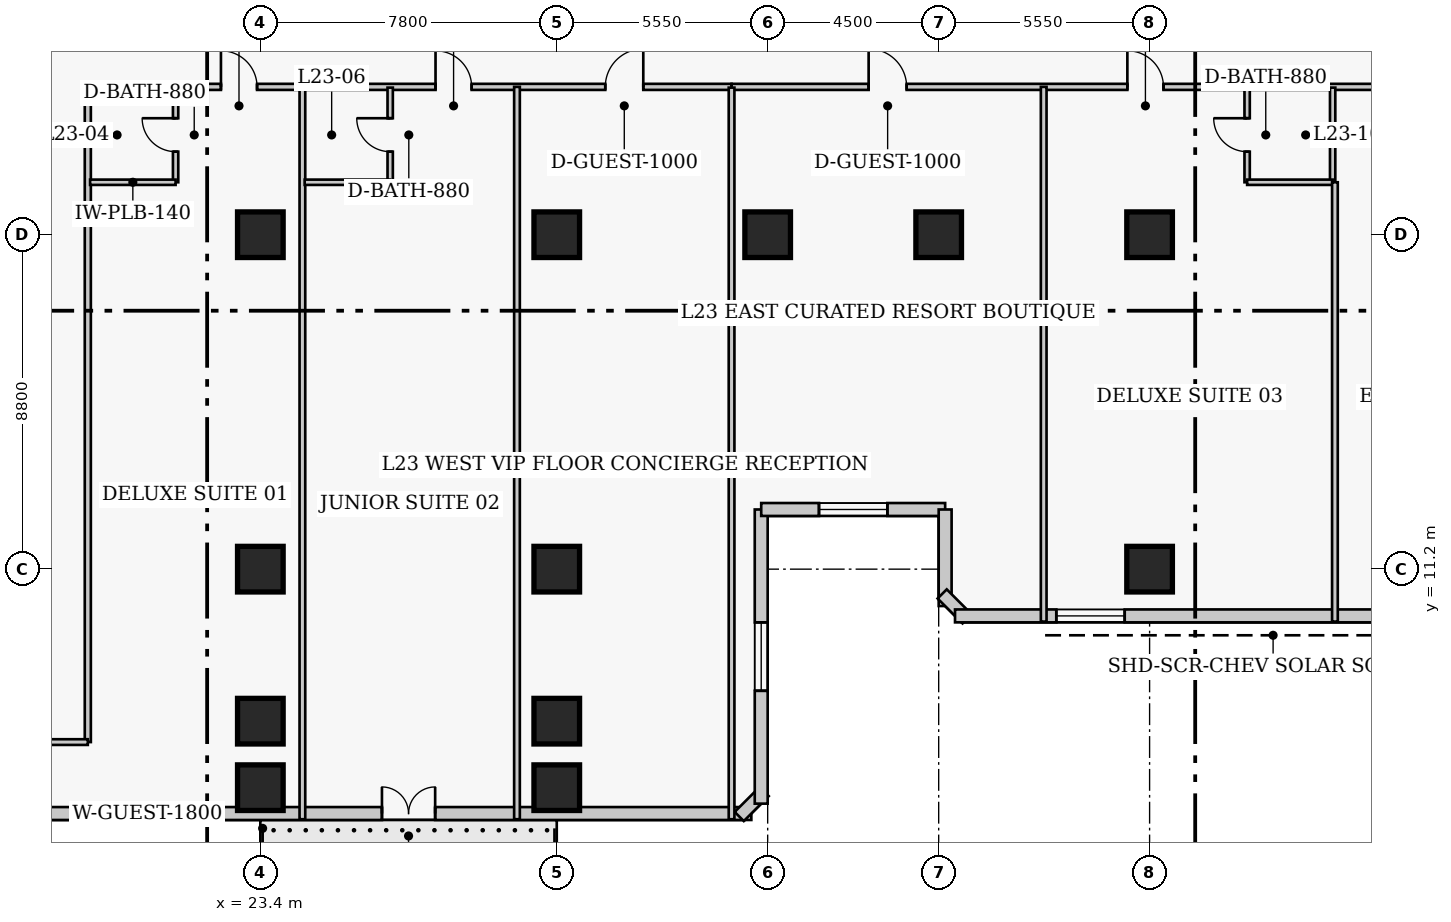
"""IFC4 building model, lengths in metres.
Left out: names, types, materials, properties, quantities, classifications, styles, units other than length and angle.
Written with IfcOpenShell. Run it as: python <this file> out.ifc"""

import sys

from ifc_helpers import new_model, si_unit, direction, frame, frame_2d, origin, origin_2d, place, context, subcontext, project, spatial, rectangle, extrude, element, fill, save


model = new_model("IFC4")
c1 = context("Model", 3, precision=1e-05, world=origin(), true_north=direction((0.0, 1.0)))
c2 = subcontext(c1, "Body", "Model", "MODEL_VIEW")
j1 = project(units=[si_unit("LENGTHUNIT", "METRE"), si_unit("PLANEANGLEUNIT", "RADIAN")], contexts=[c1])
p1 = place(None, origin())
s1 = spatial("IfcSite", under=j1, at=p1, CompositionType="ELEMENT")
p2 = place(p1, origin())
s2 = spatial("IfcBuilding", under=s1, at=p2, CompositionType="ELEMENT")
p3 = place(p2, frame((0.0, 0.0, 95.6)))
s3 = spatial("IfcBuildingStorey", under=s2, at=p3, CompositionType="ELEMENT", Elevation=95.6)
for number, where, z_axis, x_axis in (
    (1, (23.4, 11.2, 0.0), (0.0, 0.0, 1.0), (1.0, 0.0, 0.0)),
    (2, (23.4, 20.0, 0.0), (0.0, 0.0, 1.0), (1.0, 0.0, 0.0)),
    (3, (31.2, 11.2, 0.0), (0.0, 0.0, 1.0), (1.0, 0.0, 0.0)),
    (4, (31.2, 20.0, 0.0), (0.0, 0.0, 1.0), (1.0, 0.0, 0.0)),
    (5, (36.75, 20.0, 0.0), (0.0, 0.0, 1.0), (1.0, 0.0, 0.0)),
    (6, (41.25, 20.0, 0.0), (0.0, 0.0, 1.0), (1.0, 0.0, 0.0)),
    (7, (46.8, 11.2, 0.0), (0.0, 0.0, 1.0), (1.0, 0.0, 0.0)),
    (8, (46.8, 20.0, 0.0), (0.0, 0.0, 1.0), (1.0, 0.0, 0.0)),
    (9, (23.4, 7.2, 0.0), (0.0, 0.0, 1.0), (1.0, 0.0, 0.0)),
    (10, (31.2, 7.2, 0.0), (0.0, 0.0, 1.0), (1.0, 0.0, 0.0)),
    (11, (23.4, 5.45, 0.0), (0.0, 0.0, 1.0), (1.0, 0.0, 0.0)),
    (12, (31.2, 5.45, 0.0), (0.0, 0.0, 1.0), (1.0, 0.0, 0.0)),
):
    element("IfcColumn", number, at=place(p3, frame(where, z_axis=z_axis, x_axis=x_axis)), inside=s3, PredefinedType="COLUMN", context=c2, shape_type="SweptSolid", body=[
        extrude(rectangle(XDim=1.2, YDim=1.2, at=origin_2d()), origin(), (0.0, 0.0, 1.0), 3.8),
    ])
p4 = place(p3, frame((8.03, 4.77, 0.0), z_axis=(0.0, 0.0, 1.0), x_axis=(1.0, 0.0, 0.0)))
e13 = element("IfcWall", 13, at=p4, inside=s3, PredefinedType="SOLIDWALL", context=c2, shape_type="SweptSolid", body=[
    extrude(rectangle(XDim=28.29, YDim=0.34, at=frame_2d((14.145, 0.0))), origin(), (0.0, 0.0, 1.0), 3.54),
])
p5 = place(p4, frame((18.57, 0.0, 0.0)))
e14 = element("IfcOpeningElement", 14, at=p5, cuts=e13, PredefinedType="OPENING", context=c2, shape_type="SweptSolid", body=[
    extrude(rectangle(XDim=1.4, YDim=2.15, at=frame_2d((0.7, 1.075))), frame((0.0, 0.18, 0.0), z_axis=(0.0, -1.0, 0.0), x_axis=(1.0, 0.0, 0.0)), (0.0, 0.0, 1.0), 0.36),
])
p6 = place(p4, frame((12.595, 0.0, 0.85)))
e15 = element("IfcOpeningElement", 15, at=p6, cuts=e13, PredefinedType="OPENING", context=c2, shape_type="SweptSolid", body=[
    extrude(rectangle(XDim=1.8, YDim=1.8, at=frame_2d((0.9, 0.9))), frame((0.0, 0.18, 0.0), z_axis=(0.0, -1.0, 0.0), x_axis=(1.0, 0.0, 0.0)), (0.0, 0.0, 1.0), 0.36),
])
p7 = place(p3, frame((36.001, 4.692, 0.0), z_axis=(0.0, 0.0, 1.0), x_axis=(0.707238225886, 0.706975312048, 0.0)))
e16 = element("IfcWall", 16, at=p7, inside=s3, PredefinedType="SOLIDWALL", context=c2, shape_type="SweptSolid", body=[
    extrude(rectangle(XDim=0.929, YDim=0.34, at=frame_2d((0.464, 0.0))), origin(), (0.0, 0.0, 1.0), 3.54),
])
p8 = place(p3, frame((36.58, 5.03, 0.0), z_axis=(0.0, 0.0, 1.0), x_axis=(0.0, 1.0, 0.0)))
e17 = element("IfcWall", 17, at=p8, inside=s3, PredefinedType="SOLIDWALL", context=c2, shape_type="SweptSolid", body=[
    extrude(rectangle(XDim=7.74, YDim=0.34, at=frame_2d((3.87, 0.0))), origin(), (0.0, 0.0, 1.0), 3.54),
])
p9 = place(p8, frame((2.97, 0.0, 0.85)))
e18 = element("IfcOpeningElement", 18, at=p9, cuts=e17, PredefinedType="OPENING", context=c2, shape_type="SweptSolid", body=[
    extrude(rectangle(XDim=1.8, YDim=1.8, at=frame_2d((0.9, 0.9))), frame((0.0, 0.18, 0.0), z_axis=(0.0, -1.0, 0.0), x_axis=(1.0, 0.0, 0.0)), (0.0, 0.0, 1.0), 0.36),
])
p10 = place(p3, frame((36.58, 12.77, 0.0), z_axis=(0.0, 0.0, 1.0), x_axis=(1.0, 0.0, 0.0)))
e19 = element("IfcWall", 19, at=p10, inside=s3, PredefinedType="SOLIDWALL", context=c2, shape_type="SweptSolid", body=[
    extrude(rectangle(XDim=4.84, YDim=0.34, at=frame_2d((2.42, 0.0))), origin(), (0.0, 0.0, 1.0), 3.54),
])
p11 = place(p10, frame((1.52, 0.0, 0.85)))
e20 = element("IfcOpeningElement", 20, at=p11, cuts=e19, PredefinedType="OPENING", context=c2, shape_type="SweptSolid", body=[
    extrude(rectangle(XDim=1.8, YDim=1.8, at=frame_2d((0.9, 0.9))), frame((0.0, 0.18, 0.0), z_axis=(0.0, -1.0, 0.0), x_axis=(1.0, 0.0, 0.0)), (0.0, 0.0, 1.0), 0.36),
])
p12 = place(p3, frame((41.42, 12.77, 0.0), z_axis=(0.0, 0.0, 1.0), x_axis=(0.0, -1.0, 0.0)))
e21 = element("IfcWall", 21, at=p12, inside=s3, PredefinedType="SOLIDWALL", context=c2, shape_type="SweptSolid", body=[
    extrude(rectangle(XDim=2.54, YDim=0.34, at=frame_2d((1.27, 0.0))), origin(), (0.0, 0.0, 1.0), 3.54),
])
p13 = place(p3, frame((41.342, 10.549, 0.0), z_axis=(0.0, 0.0, 1.0), x_axis=(0.707106781187, -0.707106781187, 0.0)))
e22 = element("IfcWall", 22, at=p13, inside=s3, PredefinedType="SOLIDWALL", context=c2, shape_type="SweptSolid", body=[
    extrude(rectangle(XDim=0.929, YDim=0.34, at=frame_2d((0.464, 0.0))), origin(), (0.0, 0.0, 1.0), 3.54),
])
p14 = place(p3, frame((41.68, 9.97, 0.0), z_axis=(0.0, 0.0, 1.0), x_axis=(1.0, 0.0, 0.0)))
e23 = element("IfcWall", 23, at=p14, inside=s3, PredefinedType="SOLIDWALL", context=c2, shape_type="SweptSolid", body=[
    extrude(rectangle(XDim=28.29, YDim=0.34, at=frame_2d((14.145, 0.0))), origin(), (0.0, 0.0, 1.0), 3.54),
])
p15 = place(p14, frame((2.665, 0.0, 0.85)))
e24 = element("IfcOpeningElement", 24, at=p15, cuts=e23, PredefinedType="OPENING", context=c2, shape_type="SweptSolid", body=[
    extrude(rectangle(XDim=1.8, YDim=1.8, at=frame_2d((0.9, 0.9))), frame((0.0, 0.18, 0.0), z_axis=(0.0, -1.0, 0.0), x_axis=(1.0, 0.0, 0.0)), (0.0, 0.0, 1.0), 0.36),
])
p16 = place(p14, frame((13.895, 0.0, 0.85)))
e25 = element("IfcOpeningElement", 25, at=p16, cuts=e23, PredefinedType="OPENING", context=c2, shape_type="SweptSolid", body=[
    extrude(rectangle(XDim=1.8, YDim=1.8, at=frame_2d((0.9, 0.9))), frame((0.0, 0.18, 0.0), z_axis=(0.0, -1.0, 0.0), x_axis=(1.0, 0.0, 0.0)), (0.0, 0.0, 1.0), 0.36),
])
p17 = place(p3, frame((18.8, 23.89, 0.0), z_axis=(0.0, 0.0, 1.0), x_axis=(1.0, 0.0, 0.0)))
e26 = element("IfcWall", 26, at=p17, inside=s3, PredefinedType="PARTITIONING", context=c2, shape_type="SweptSolid", body=[
    extrude(rectangle(XDim=17.0, YDim=0.16, at=frame_2d((8.5, 0.0))), origin(), (0.0, 0.0, 1.0), 3.54),
])
p18 = place(p17, frame((3.563, 0.0, 0.0)))
e27 = element("IfcOpeningElement", 27, at=p18, cuts=e26, PredefinedType="OPENING", context=c2, shape_type="SweptSolid", body=[
    extrude(rectangle(XDim=0.95, YDim=2.1, at=frame_2d((0.475, 1.05))), frame((0.0, 0.09, 0.0), z_axis=(0.0, -1.0, 0.0), x_axis=(1.0, 0.0, 0.0)), (0.0, 0.0, 1.0), 0.18),
])
p19 = place(p17, frame((9.21, 0.0, 0.0)))
e28 = element("IfcOpeningElement", 28, at=p19, cuts=e26, PredefinedType="OPENING", context=c2, shape_type="SweptSolid", body=[
    extrude(rectangle(XDim=0.95, YDim=2.1, at=frame_2d((0.475, 1.05))), frame((0.0, 0.09, 0.0), z_axis=(0.0, -1.0, 0.0), x_axis=(1.0, 0.0, 0.0)), (0.0, 0.0, 1.0), 0.18),
])
p20 = place(p17, frame((13.677, 0.0, 0.0)))
e29 = element("IfcOpeningElement", 29, at=p20, cuts=e26, PredefinedType="OPENING", context=c2, shape_type="SweptSolid", body=[
    extrude(rectangle(XDim=1.0, YDim=2.15, at=frame_2d((0.5, 1.075))), frame((0.0, 0.09, 0.0), z_axis=(0.0, -1.0, 0.0), x_axis=(1.0, 0.0, 0.0)), (0.0, 0.0, 1.0), 0.18),
])
p21 = place(p3, frame((35.8, 23.89, 0.0), z_axis=(0.0, 0.0, 1.0), x_axis=(1.0, 0.0, 0.0)))
e30 = element("IfcWall", 30, at=p21, inside=s3, PredefinedType="PARTITIONING", context=c2, shape_type="SweptSolid", body=[
    extrude(rectangle(XDim=23.05, YDim=0.16, at=frame_2d((11.525, 0.0))), origin(), (0.0, 0.0, 1.0), 3.54),
])
p22 = place(p21, frame((3.607, 0.0, 0.0)))
e31 = element("IfcOpeningElement", 31, at=p22, cuts=e30, PredefinedType="OPENING", context=c2, shape_type="SweptSolid", body=[
    extrude(rectangle(XDim=1.0, YDim=2.15, at=frame_2d((0.5, 1.075))), frame((0.0, 0.09, 0.0), z_axis=(0.0, -1.0, 0.0), x_axis=(1.0, 0.0, 0.0)), (0.0, 0.0, 1.0), 0.18),
])
p23 = place(p21, frame((10.415, 0.0, 0.0)))
e32 = element("IfcOpeningElement", 32, at=p23, cuts=e30, PredefinedType="OPENING", context=c2, shape_type="SweptSolid", body=[
    extrude(rectangle(XDim=0.95, YDim=2.1, at=frame_2d((0.475, 1.05))), frame((0.0, 0.09, 0.0), z_axis=(0.0, -1.0, 0.0), x_axis=(1.0, 0.0, 0.0)), (0.0, 0.0, 1.0), 0.18),
])
p24 = place(p21, frame((17.803, 0.0, 0.0)))
e33 = element("IfcOpeningElement", 33, at=p24, cuts=e30, PredefinedType="OPENING", context=c2, shape_type="SweptSolid", body=[
    extrude(rectangle(XDim=0.95, YDim=2.1, at=frame_2d((0.475, 1.05))), frame((0.0, 0.09, 0.0), z_axis=(0.0, -1.0, 0.0), x_axis=(1.0, 0.0, 0.0)), (0.0, 0.0, 1.0), 0.18),
])
p25 = place(p3, frame((18.86, 6.65, 0.0), z_axis=(0.0, 0.0, 1.0), x_axis=(0.0, 1.0, 0.0)))
e34 = element("IfcWall", 34, at=p25, inside=s3, PredefinedType="PARTITIONING", context=c2, shape_type="SweptSolid", body=[
    extrude(rectangle(XDim=17.24, YDim=0.16, at=frame_2d((8.62, 0.0))), origin(), (0.0, 0.0, 1.0), 3.54),
])
p26 = place(p3, frame((16.64, 6.65, 0.0), z_axis=(0.0, 0.0, 1.0), x_axis=(1.0, 0.0, 0.0)))
e35 = element("IfcWall", 35, at=p26, inside=s3, PredefinedType="PARTITIONING", context=c2, shape_type="SweptSolid", body=[
    extrude(rectangle(XDim=2.22, YDim=0.15, at=frame_2d((1.11, 0.0))), origin(), (0.0, 0.0, 1.0), 3.54),
])
p27 = place(p3, frame((21.17, 21.38, 0.0), z_axis=(0.0, 0.0, 1.0), x_axis=(0.0, 1.0, 0.0)))
e36 = element("IfcWall", 36, at=p27, inside=s3, PredefinedType="PLUMBINGWALL", context=c2, shape_type="SweptSolid", body=[
    extrude(rectangle(XDim=2.49, YDim=0.14, at=frame_2d((1.245, 0.0))), origin(), (0.0, 0.0, 1.0), 3.54),
])
p28 = place(p27, frame((0.805, 0.0, 0.0)))
e37 = element("IfcOpeningElement", 37, at=p28, cuts=e36, PredefinedType="OPENING", context=c2, shape_type="SweptSolid", body=[
    extrude(rectangle(XDim=0.88, YDim=2.05, at=frame_2d((0.44, 1.025))), frame((0.0, 0.08, 0.0), z_axis=(0.0, -1.0, 0.0), x_axis=(1.0, 0.0, 0.0)), (0.0, 0.0, 1.0), 0.16),
])
p29 = place(p3, frame((18.92, 21.38, 0.0), z_axis=(0.0, 0.0, 1.0), x_axis=(1.0, 0.0, 0.0)))
e38 = element("IfcWall", 38, at=p29, inside=s3, PredefinedType="PLUMBINGWALL", context=c2, shape_type="SweptSolid", body=[
    extrude(rectangle(XDim=2.25, YDim=0.14, at=frame_2d((1.125, 0.0))), origin(), (0.0, 0.0, 1.0), 3.54),
])
p30 = place(p3, frame((24.507, 4.62, 0.0), z_axis=(0.0, 0.0, 1.0), x_axis=(0.0, 1.0, 0.0)))
e39 = element("IfcWall", 39, at=p30, inside=s3, PredefinedType="PARTITIONING", context=c2, shape_type="SweptSolid", body=[
    extrude(rectangle(XDim=19.27, YDim=0.15, at=frame_2d((9.635, 0.0))), origin(), (0.0, 0.0, 1.0), 3.54),
])
p31 = place(p3, frame((26.817, 21.38, 0.0), z_axis=(0.0, 0.0, 1.0), x_axis=(0.0, 1.0, 0.0)))
e40 = element("IfcWall", 40, at=p31, inside=s3, PredefinedType="PLUMBINGWALL", context=c2, shape_type="SweptSolid", body=[
    extrude(rectangle(XDim=2.49, YDim=0.14, at=frame_2d((1.245, 0.0))), origin(), (0.0, 0.0, 1.0), 3.54),
])
p32 = place(p31, frame((0.805, 0.0, 0.0)))
e41 = element("IfcOpeningElement", 41, at=p32, cuts=e40, PredefinedType="OPENING", context=c2, shape_type="SweptSolid", body=[
    extrude(rectangle(XDim=0.88, YDim=2.05, at=frame_2d((0.44, 1.025))), frame((0.0, 0.08, 0.0), z_axis=(0.0, -1.0, 0.0), x_axis=(1.0, 0.0, 0.0)), (0.0, 0.0, 1.0), 0.16),
])
p33 = place(p3, frame((24.567, 21.38, 0.0), z_axis=(0.0, 0.0, 1.0), x_axis=(1.0, 0.0, 0.0)))
e42 = element("IfcWall", 42, at=p33, inside=s3, PredefinedType="PLUMBINGWALL", context=c2, shape_type="SweptSolid", body=[
    extrude(rectangle(XDim=2.25, YDim=0.14, at=frame_2d((1.125, 0.0))), origin(), (0.0, 0.0, 1.0), 3.54),
])
p34 = place(p3, frame((30.153, 4.62, 0.0), z_axis=(0.0, 0.0, 1.0), x_axis=(0.0, 1.0, 0.0)))
e43 = element("IfcWall", 43, at=p34, inside=s3, PredefinedType="PARTITIONING", context=c2, shape_type="SweptSolid", body=[
    extrude(rectangle(XDim=19.27, YDim=0.15, at=frame_2d((9.635, 0.0))), origin(), (0.0, 0.0, 1.0), 3.54),
])
p35 = place(p3, frame((35.8, 4.62, 0.0), z_axis=(0.0, 0.0, 1.0), x_axis=(0.0, 1.0, 0.0)))
e44 = element("IfcWall", 44, at=p35, inside=s3, PredefinedType="PARTITIONING", context=c2, shape_type="SweptSolid", body=[
    extrude(rectangle(XDim=19.25, YDim=0.15, at=frame_2d((9.625, 0.0))), origin(), (0.0, 0.0, 1.0), 3.54),
])
p36 = place(p3, frame((44.013, 9.82, 0.0), z_axis=(0.0, 0.0, 1.0), x_axis=(0.0, 1.0, 0.0)))
e45 = element("IfcWall", 45, at=p36, inside=s3, PredefinedType="PARTITIONING", context=c2, shape_type="SweptSolid", body=[
    extrude(rectangle(XDim=14.07, YDim=0.15, at=frame_2d((7.035, 0.0))), origin(), (0.0, 0.0, 1.0), 3.54),
])
p37 = place(p3, frame((49.367, 21.38, 0.0), z_axis=(0.0, 0.0, 1.0), x_axis=(0.0, 1.0, 0.0)))
e46 = element("IfcWall", 46, at=p37, inside=s3, PredefinedType="PLUMBINGWALL", context=c2, shape_type="SweptSolid", body=[
    extrude(rectangle(XDim=2.49, YDim=0.14, at=frame_2d((1.245, 0.0))), origin(), (0.0, 0.0, 1.0), 3.54),
])
p38 = place(p37, frame((0.805, 0.0, 0.0)))
e47 = element("IfcOpeningElement", 47, at=p38, cuts=e46, PredefinedType="OPENING", context=c2, shape_type="SweptSolid", body=[
    extrude(rectangle(XDim=0.88, YDim=2.05, at=frame_2d((0.44, 1.025))), frame((0.0, 0.08, 0.0), z_axis=(0.0, -1.0, 0.0), x_axis=(1.0, 0.0, 0.0)), (0.0, 0.0, 1.0), 0.16),
])
p39 = place(p3, frame((51.617, 21.38, 0.0), z_axis=(0.0, 0.0, 1.0), x_axis=(0.0, 1.0, 0.0)))
e48 = element("IfcWall", 48, at=p39, inside=s3, PredefinedType="PLUMBINGWALL", context=c2, shape_type="SweptSolid", body=[
    extrude(rectangle(XDim=2.49, YDim=0.14, at=frame_2d((1.245, 0.0))), origin(), (0.0, 0.0, 1.0), 3.54),
])
p40 = place(p3, frame((49.367, 21.38, 0.0), z_axis=(0.0, 0.0, 1.0), x_axis=(1.0, 0.0, 0.0)))
e49 = element("IfcWall", 49, at=p40, inside=s3, PredefinedType="PLUMBINGWALL", context=c2, shape_type="SweptSolid", body=[
    extrude(rectangle(XDim=2.25, YDim=0.14, at=frame_2d((1.125, 0.0))), origin(), (0.0, 0.0, 1.0), 3.54),
])
p41 = place(p3, frame((51.677, 9.82, 0.0), z_axis=(0.0, 0.0, 1.0), x_axis=(0.0, 1.0, 0.0)))
e50 = element("IfcWall", 50, at=p41, inside=s3, PredefinedType="PARTITIONING", context=c2, shape_type="SweptSolid", body=[
    extrude(rectangle(XDim=11.56, YDim=0.15, at=frame_2d((5.78, 0.0))), origin(), (0.0, 0.0, 1.0), 3.54),
])
p42 = place(p5, origin())
e51 = element("IfcDoor", 51, at=p42, inside=s3, OperationType="DOUBLE_DOOR_SINGLE_SWING", PredefinedType="DOOR", context=c2, shape_type="SweptSolid", body=[
    extrude(rectangle(XDim=1.4, YDim=2.15, at=frame_2d((0.7, 1.075))), frame((0.0, 0.025, 0.0), z_axis=(0.0, -1.0, 0.0), x_axis=(1.0, 0.0, 0.0)), (0.0, 0.0, 1.0), 0.05),
])
fill(e14, e51)
p43 = place(p6, origin())
e52 = element("IfcWindow", 52, at=p43, inside=s3, PartitioningType="SINGLE_PANEL", PredefinedType="WINDOW", context=c2, shape_type="SweptSolid", body=[
    extrude(rectangle(XDim=1.8, YDim=1.8, at=frame_2d((0.9, 0.9))), frame((0.0, 0.03, 0.0), z_axis=(0.0, -1.0, 0.0), x_axis=(1.0, 0.0, 0.0)), (0.0, 0.0, 1.0), 0.06),
])
fill(e15, e52)
p44 = place(p9, origin())
e53 = element("IfcWindow", 53, at=p44, inside=s3, PartitioningType="SINGLE_PANEL", PredefinedType="WINDOW", context=c2, shape_type="SweptSolid", body=[
    extrude(rectangle(XDim=1.8, YDim=1.8, at=frame_2d((0.9, 0.9))), frame((0.0, 0.03, 0.0), z_axis=(0.0, -1.0, 0.0), x_axis=(1.0, 0.0, 0.0)), (0.0, 0.0, 1.0), 0.06),
])
fill(e18, e53)
p45 = place(p11, origin())
e54 = element("IfcWindow", 54, at=p45, inside=s3, PartitioningType="SINGLE_PANEL", PredefinedType="WINDOW", context=c2, shape_type="SweptSolid", body=[
    extrude(rectangle(XDim=1.8, YDim=1.8, at=frame_2d((0.9, 0.9))), frame((0.0, 0.03, 0.0), z_axis=(0.0, -1.0, 0.0), x_axis=(1.0, 0.0, 0.0)), (0.0, 0.0, 1.0), 0.06),
])
fill(e20, e54)
p46 = place(p15, origin())
e55 = element("IfcWindow", 55, at=p46, inside=s3, PartitioningType="SINGLE_PANEL", PredefinedType="WINDOW", context=c2, shape_type="SweptSolid", body=[
    extrude(rectangle(XDim=1.8, YDim=1.8, at=frame_2d((0.9, 0.9))), frame((0.0, 0.03, 0.0), z_axis=(0.0, -1.0, 0.0), x_axis=(1.0, 0.0, 0.0)), (0.0, 0.0, 1.0), 0.06),
])
fill(e24, e55)
p47 = place(p28, origin())
e56 = element("IfcDoor", 56, at=p47, inside=s3, OperationType="SINGLE_SWING_RIGHT", PredefinedType="DOOR", context=c2, shape_type="SweptSolid", body=[
    extrude(rectangle(XDim=0.88, YDim=2.05, at=frame_2d((0.44, 1.025))), frame((0.0, 0.025, 0.0), z_axis=(0.0, -1.0, 0.0), x_axis=(1.0, 0.0, 0.0)), (0.0, 0.0, 1.0), 0.05),
])
fill(e37, e56)
p48 = place(p18, origin())
e57 = element("IfcDoor", 57, at=p48, inside=s3, OperationType="SINGLE_SWING_LEFT", PredefinedType="DOOR", context=c2, shape_type="SweptSolid", body=[
    extrude(rectangle(XDim=0.95, YDim=2.1, at=frame_2d((0.475, 1.05))), frame((0.0, 0.025, 0.0), z_axis=(0.0, -1.0, 0.0), x_axis=(1.0, 0.0, 0.0)), (0.0, 0.0, 1.0), 0.05),
])
fill(e27, e57)
p49 = place(p32, origin())
e58 = element("IfcDoor", 58, at=p49, inside=s3, OperationType="SINGLE_SWING_RIGHT", PredefinedType="DOOR", context=c2, shape_type="SweptSolid", body=[
    extrude(rectangle(XDim=0.88, YDim=2.05, at=frame_2d((0.44, 1.025))), frame((0.0, 0.025, 0.0), z_axis=(0.0, -1.0, 0.0), x_axis=(1.0, 0.0, 0.0)), (0.0, 0.0, 1.0), 0.05),
])
fill(e41, e58)
p50 = place(p19, origin())
e59 = element("IfcDoor", 59, at=p50, inside=s3, OperationType="SINGLE_SWING_LEFT", PredefinedType="DOOR", context=c2, shape_type="SweptSolid", body=[
    extrude(rectangle(XDim=0.95, YDim=2.1, at=frame_2d((0.475, 1.05))), frame((0.0, 0.025, 0.0), z_axis=(0.0, -1.0, 0.0), x_axis=(1.0, 0.0, 0.0)), (0.0, 0.0, 1.0), 0.05),
])
fill(e28, e59)
p51 = place(p20, origin())
e60 = element("IfcDoor", 60, at=p51, inside=s3, OperationType="SINGLE_SWING_RIGHT", PredefinedType="DOOR", context=c2, shape_type="SweptSolid", body=[
    extrude(rectangle(XDim=1.0, YDim=2.15, at=frame_2d((0.5, 1.075))), frame((0.0, 0.025, 0.0), z_axis=(0.0, -1.0, 0.0), x_axis=(1.0, 0.0, 0.0)), (0.0, 0.0, 1.0), 0.05),
])
fill(e29, e60)
p52 = place(p22, origin())
e61 = element("IfcDoor", 61, at=p52, inside=s3, OperationType="SINGLE_SWING_LEFT", PredefinedType="DOOR", context=c2, shape_type="SweptSolid", body=[
    extrude(rectangle(XDim=1.0, YDim=2.15, at=frame_2d((0.5, 1.075))), frame((0.0, 0.025, 0.0), z_axis=(0.0, -1.0, 0.0), x_axis=(1.0, 0.0, 0.0)), (0.0, 0.0, 1.0), 0.05),
])
fill(e31, e61)
p53 = place(p38, origin())
e62 = element("IfcDoor", 62, at=p53, inside=s3, OperationType="SINGLE_SWING_RIGHT", PredefinedType="DOOR", context=c2, shape_type="SweptSolid", body=[
    extrude(rectangle(XDim=0.88, YDim=2.05, at=frame_2d((0.44, 1.025))), frame((0.0, 0.025, 0.0), z_axis=(0.0, -1.0, 0.0), x_axis=(1.0, 0.0, 0.0)), (0.0, 0.0, 1.0), 0.05),
])
fill(e47, e62)
p54 = place(p23, origin())
e63 = element("IfcDoor", 63, at=p54, inside=s3, OperationType="SINGLE_SWING_LEFT", PredefinedType="DOOR", context=c2, shape_type="SweptSolid", body=[
    extrude(rectangle(XDim=0.95, YDim=2.1, at=frame_2d((0.475, 1.05))), frame((0.0, 0.025, 0.0), z_axis=(0.0, -1.0, 0.0), x_axis=(1.0, 0.0, 0.0)), (0.0, 0.0, 1.0), 0.05),
])
fill(e32, e63)
save(model, sys.argv[1])
